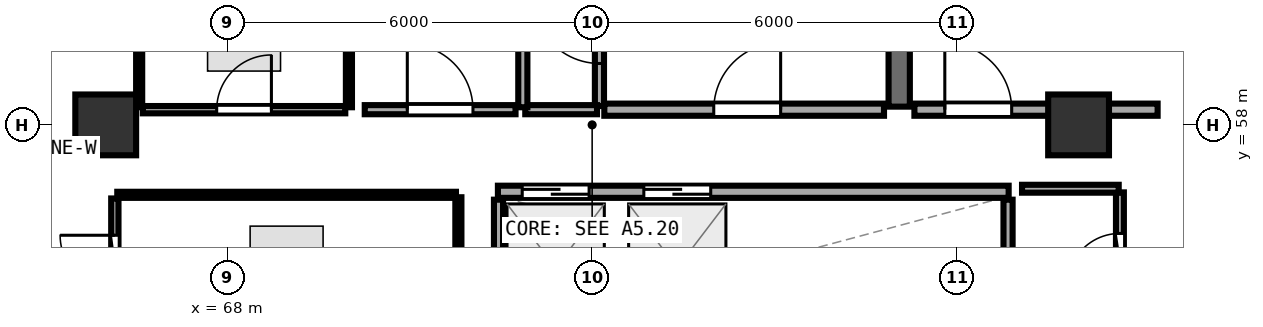
"""IFC4 building model, lengths in metres.
Left out: names, types, materials, properties, quantities, classifications, styles, units other than length and angle.
Written with IfcOpenShell. Run it as: python <this file> out.ifc"""

import sys

from ifc_helpers import new_model, si_unit, direction, frame, frame_2d, origin, origin_2d, place, context, subcontext, project, spatial, rectangle, extrude, element, fill, save


model = new_model("IFC4")
c1 = context("Model", 3, precision=1e-05, world=origin(), true_north=direction((0.0, 1.0)))
c2 = subcontext(c1, "Body", "Model", "MODEL_VIEW")
j1 = project(units=[si_unit("LENGTHUNIT", "METRE"), si_unit("PLANEANGLEUNIT", "RADIAN")], contexts=[c1])
p1 = place(None, origin())
s1 = spatial("IfcSite", under=j1, at=p1, CompositionType="ELEMENT")
p2 = place(p1, origin())
s2 = spatial("IfcBuilding", under=s1, at=p2, CompositionType="ELEMENT")
p3 = place(p2, frame((0.0, 0.0, 252.45)))
s3 = spatial("IfcBuildingStorey", under=s2, at=p3, CompositionType="ELEMENT", Elevation=252.45)
for number, where, z_axis, x_axis in (
    (1, (82.0, 58.0, 0.0), (0.0, 0.0, 1.0), (1.0, 0.0, 0.0)),
    (2, (66.0, 58.0, 0.0), (0.0, 0.0, 1.0), (1.0, 0.0, 0.0)),
):
    element("IfcColumn", number, at=place(p3, frame(where, z_axis=z_axis, x_axis=x_axis)), inside=s3, PredefinedType="PILASTER", context=c2, shape_type="SweptSolid", body=[
        extrude(rectangle(XDim=1.0, YDim=1.0, at=origin_2d()), origin(), (0.0, 0.0, 1.0), 3.75),
    ])
p4 = place(p3, frame((79.05, 58.3, 0.0), z_axis=(0.0, 0.0, 1.0), x_axis=(0.0, 1.0, 0.0)))
e3 = element("IfcWall", 3, at=p4, inside=s3, PredefinedType="SHEAR", context=c2, shape_type="SweptSolid", body=[
    extrude(rectangle(XDim=6.3, YDim=0.35, at=frame_2d((3.15, 0.0))), origin(), (0.0, 0.0, 1.0), 3.49),
])
p5 = place(p3, frame((74.2, 58.25, 0.0), z_axis=(0.0, 0.0, 1.0), x_axis=(1.0, 0.0, 0.0)))
e4 = element("IfcWall", 4, at=p5, inside=s3, PredefinedType="SOLIDWALL", context=c2, shape_type="SweptSolid", body=[
    extrude(rectangle(XDim=4.6, YDim=0.2, at=frame_2d((2.3, 0.0))), origin(), (0.0, 0.0, 1.0), 3.48),
])
p6 = place(p5, frame((1.8, 0.0, 0.0)))
e5 = element("IfcOpeningElement", 5, at=p6, cuts=e4, PredefinedType="OPENING", context=c2, shape_type="SweptSolid", body=[
    extrude(rectangle(XDim=1.1, YDim=2.1, at=frame_2d((0.55, 1.05))), frame((0.0, 0.11, 0.0), z_axis=(0.0, -1.0, 0.0), x_axis=(1.0, 0.0, 0.0)), (0.0, 0.0, 1.0), 0.22),
])
p7 = place(p3, frame((79.3, 58.25, 0.0), z_axis=(0.0, 0.0, 1.0), x_axis=(1.0, 0.0, 0.0)))
e6 = element("IfcWall", 6, at=p7, inside=s3, PredefinedType="SOLIDWALL", context=c2, shape_type="SweptSolid", body=[
    extrude(rectangle(XDim=4.0, YDim=0.2, at=frame_2d((2.0, 0.0))), origin(), (0.0, 0.0, 1.0), 2.775),
])
p8 = place(p7, frame((0.5, 0.0, 0.0)))
e7 = element("IfcOpeningElement", 7, at=p8, cuts=e6, PredefinedType="OPENING", context=c2, shape_type="SweptSolid", body=[
    extrude(rectangle(XDim=1.1, YDim=2.1, at=frame_2d((0.55, 1.05))), frame((0.0, 0.11, 0.0), z_axis=(0.0, -1.0, 0.0), x_axis=(1.0, 0.0, 0.0)), (0.0, 0.0, 1.0), 0.22),
])
p9 = place(p3, frame((72.45, 56.9, 0.0), z_axis=(0.0, 0.0, 1.0), x_axis=(1.0, 0.0, 0.0)))
e8 = element("IfcWall", 8, at=p9, inside=s3, PredefinedType="SOLIDWALL", context=c2, shape_type="SweptSolid", body=[
    extrude(rectangle(XDim=8.4, YDim=0.2, at=frame_2d((4.2, 0.0))), origin(), (0.0, 0.0, 1.0), 3.48),
])
p10 = place(p9, frame((0.4, 0.0, 0.0)))
e9 = element("IfcOpeningElement", 9, at=p10, cuts=e8, PredefinedType="OPENING", context=c2, shape_type="SweptSolid", body=[
    extrude(rectangle(XDim=1.1, YDim=2.1, at=frame_2d((0.55, 1.05))), frame((0.0, 0.11, 0.0), z_axis=(0.0, -1.0, 0.0), x_axis=(1.0, 0.0, 0.0)), (0.0, 0.0, 1.0), 0.22),
])
p11 = place(p9, frame((2.4, 0.0, 0.0)))
e10 = element("IfcOpeningElement", 10, at=p11, cuts=e8, PredefinedType="OPENING", context=c2, shape_type="SweptSolid", body=[
    extrude(rectangle(XDim=1.1, YDim=2.1, at=frame_2d((0.55, 1.05))), frame((0.0, 0.11, 0.0), z_axis=(0.0, -1.0, 0.0), x_axis=(1.0, 0.0, 0.0)), (0.0, 0.0, 1.0), 0.22),
])
for number, where, z_axis, x_axis in (
    (11, (72.46, 54.48, 0.0), (0.0, 0.0, 1.0), (0.0, 1.0, 0.0)),
    (12, (80.84, 54.48, 0.0), (0.0, 0.0, 1.0), (0.0, 1.0, 0.0)),
):
    element("IfcWall", number, at=place(p3, frame(where, z_axis=z_axis, x_axis=x_axis)), inside=s3, PredefinedType="PARTITIONING", context=c2, shape_type="SweptSolid", body=[
        extrude(rectangle(XDim=2.29, YDim=0.15, at=frame_2d((1.145, 0.0))), origin(), (0.0, 0.0, 1.0), 3.48),
    ])
p12 = place(p3, frame((74.12, 58.31, 0.0), z_axis=(0.0, 0.0, 1.0), x_axis=(0.0, 1.0, 0.0)))
e13 = element("IfcWall", 13, at=p12, inside=s3, PredefinedType="PARTITIONING", context=c2, shape_type="SweptSolid", body=[
    extrude(rectangle(XDim=2.48, YDim=0.15, at=frame_2d((1.24, 0.0))), origin(), (0.0, 0.0, 1.0), 3.48),
])
p13 = place(p12, frame((0.7, 0.0, 0.0)))
e14 = element("IfcOpeningElement", 14, at=p13, cuts=e13, PredefinedType="OPENING", context=c2, shape_type="SweptSolid", body=[
    extrude(rectangle(XDim=1.08, YDim=2.1, at=frame_2d((0.54, 1.05))), frame((0.0, 0.085, 0.0), z_axis=(0.0, -1.0, 0.0), x_axis=(1.0, 0.0, 0.0)), (0.0, 0.0, 1.0), 0.17),
])
p14 = place(p3, frame((82.68, 54.68, 0.0), z_axis=(0.0, 0.0, 1.0), x_axis=(0.0, 1.0, 0.0)))
e15 = element("IfcWall", 15, at=p14, inside=s3, PredefinedType="PLUMBINGWALL", context=c2, shape_type="SweptSolid", body=[
    extrude(rectangle(XDim=2.21, YDim=0.13, at=frame_2d((1.105, 0.0))), origin(), (0.0, 0.0, 1.0), 3.48),
])
p15 = place(p14, frame((0.675, 0.0, 0.0)))
e16 = element("IfcOpeningElement", 16, at=p15, cuts=e15, PredefinedType="OPENING", context=c2, shape_type="SweptSolid", body=[
    extrude(rectangle(XDim=0.86, YDim=2.05, at=frame_2d((0.43, 1.025))), frame((0.0, 0.075, 0.0), z_axis=(0.0, -1.0, 0.0), x_axis=(1.0, 0.0, 0.0)), (0.0, 0.0, 1.0), 0.15),
])
p16 = place(p3, frame((66.61, 58.25, 0.0), z_axis=(0.0, 0.0, 1.0), x_axis=(1.0, 0.0, 0.0)))
e17 = element("IfcWall", 17, at=p16, inside=s3, PredefinedType="PARTITIONING", context=c2, shape_type="SweptSolid", body=[
    extrude(rectangle(XDim=3.33, YDim=0.12, at=frame_2d((1.665, 0.0))), origin(), (0.0, 0.0, 1.0), 3.48),
])
p17 = place(p16, frame((1.215, 0.0, 0.0)))
e18 = element("IfcOpeningElement", 18, at=p17, cuts=e17, PredefinedType="OPENING", context=c2, shape_type="SweptSolid", body=[
    extrude(rectangle(XDim=0.9, YDim=2.08, at=frame_2d((0.45, 1.04))), frame((0.0, 0.07, 0.0), z_axis=(0.0, -1.0, 0.0), x_axis=(1.0, 0.0, 0.0)), (0.0, 0.0, 1.0), 0.14),
])
p18 = place(p3, frame((70.26, 58.25, 0.0), z_axis=(0.0, 0.0, 1.0), x_axis=(1.0, 0.0, 0.0)))
e19 = element("IfcWall", 19, at=p18, inside=s3, PredefinedType="PARTITIONING", context=c2, shape_type="SweptSolid", body=[
    extrude(rectangle(XDim=2.48, YDim=0.15, at=frame_2d((1.24, 0.0))), origin(), (0.0, 0.0, 1.0), 3.48),
])
p19 = place(p18, frame((0.7, 0.0, 0.0)))
e20 = element("IfcOpeningElement", 20, at=p19, cuts=e19, PredefinedType="OPENING", context=c2, shape_type="SweptSolid", body=[
    extrude(rectangle(XDim=1.08, YDim=2.1, at=frame_2d((0.54, 1.05))), frame((0.0, 0.085, 0.0), z_axis=(0.0, -1.0, 0.0), x_axis=(1.0, 0.0, 0.0)), (0.0, 0.0, 1.0), 0.17),
])
p20 = place(p3, frame((66.15, 54.68, 0.0), z_axis=(0.0, 0.0, 1.0), x_axis=(0.0, 1.0, 0.0)))
e21 = element("IfcWall", 21, at=p20, inside=s3, PredefinedType="PARTITIONING", context=c2, shape_type="SweptSolid", body=[
    extrude(rectangle(XDim=2.11, YDim=0.12, at=frame_2d((1.055, 0.0))), origin(), (0.0, 0.0, 1.0), 2.775),
])
p21 = place(p20, frame((0.605, 0.0, 0.0)))
e22 = element("IfcOpeningElement", 22, at=p21, cuts=e21, PredefinedType="OPENING", context=c2, shape_type="SweptSolid", body=[
    extrude(rectangle(XDim=0.9, YDim=2.08, at=frame_2d((0.45, 1.04))), frame((0.0, 0.07, 0.0), z_axis=(0.0, -1.0, 0.0), x_axis=(1.0, 0.0, 0.0)), (0.0, 0.0, 1.0), 0.14),
])
p22 = place(p3, frame((72.9, 58.25, 0.0), z_axis=(0.0, 0.0, 1.0), x_axis=(1.0, 0.0, 0.0)))
e23 = element("IfcWall", 23, at=p22, inside=s3, PredefinedType="PARTITIONING", context=c2, shape_type="SweptSolid", body=[
    extrude(rectangle(XDim=1.18, YDim=0.15, at=frame_2d((0.59, 0.0))), origin(), (0.0, 0.0, 1.0), 3.48),
])
p23 = place(p3, frame((72.86, 60.81, 0.0), z_axis=(0.0, 0.0, 1.0), x_axis=(0.0, -1.0, 0.0)))
e24 = element("IfcWall", 24, at=p23, inside=s3, PredefinedType="PARTITIONING", context=c2, shape_type="SweptSolid", body=[
    extrude(rectangle(XDim=2.52, YDim=0.15, at=frame_2d((1.26, 0.0))), origin(), (0.0, 0.0, 1.0), 3.48),
])
p24 = place(p3, frame((82.66, 56.95, 0.0), z_axis=(0.0, 0.0, 1.0), x_axis=(-1.0, 0.0, 0.0)))
e25 = element("IfcWall", 25, at=p24, inside=s3, PredefinedType="PLUMBINGWALL", context=c2, shape_type="SweptSolid", body=[
    extrude(rectangle(XDim=1.59, YDim=0.13, at=frame_2d((0.795, 0.0))), origin(), (0.0, 0.0, 1.0), 2.775),
])
for number, where, z_axis, x_axis in (
    (26, (70.0, 58.29, 0.0), (0.0, 0.0, 1.0), (0.0, 1.0, 0.0)),
    (27, (66.55, 60.68, 0.0), (0.0, 0.0, 1.0), (0.0, -1.0, 0.0)),
):
    element("IfcWall", number, at=place(p3, frame(where, z_axis=z_axis, x_axis=x_axis)), inside=s3, PredefinedType="PARTITIONING", context=c2, shape_type="SweptSolid", body=[
        extrude(rectangle(XDim=2.39, YDim=0.1, at=frame_2d((1.195, 0.0))), origin(), (0.0, 0.0, 1.0), 3.48),
    ])
p25 = place(p3, frame((71.8, 54.66, 0.0), z_axis=(0.0, 0.0, 1.0), x_axis=(0.0, 1.0, 0.0)))
e28 = element("IfcWall", 28, at=p25, inside=s3, PredefinedType="PARTITIONING", context=c2, shape_type="SweptSolid", body=[
    extrude(rectangle(XDim=2.15, YDim=0.1, at=frame_2d((1.075, 0.0))), origin(), (0.0, 0.0, 1.0), 3.48),
])
p26 = place(p3, frame((71.76, 56.85, 0.0), z_axis=(0.0, 0.0, 1.0), x_axis=(-1.0, 0.0, 0.0)))
e29 = element("IfcWall", 29, at=p26, inside=s3, PredefinedType="PARTITIONING", context=c2, shape_type="SweptSolid", body=[
    extrude(rectangle(XDim=5.57, YDim=0.1, at=frame_2d((2.785, 0.0))), origin(), (0.0, 0.0, 1.0), 2.775),
])
p27 = place(p6, frame((1.1, 0.0, 0.0), z_axis=(0.0, 0.0, 1.0), x_axis=(-1.0, 0.0, 0.0)))
e30 = element("IfcDoor", 30, at=p27, inside=s3, OperationType="SINGLE_SWING_LEFT", PredefinedType="DOOR", context=c2, shape_type="SweptSolid", body=[
    extrude(rectangle(XDim=1.1, YDim=2.1, at=frame_2d((0.55, 1.05))), frame((0.0, 0.025, 0.0), z_axis=(0.0, -1.0, 0.0), x_axis=(1.0, 0.0, 0.0)), (0.0, 0.0, 1.0), 0.05),
])
fill(e5, e30)
p28 = place(p8, frame((1.1, 0.0, 0.0), z_axis=(0.0, 0.0, 1.0), x_axis=(-1.0, 0.0, 0.0)))
e31 = element("IfcDoor", 31, at=p28, inside=s3, OperationType="SINGLE_SWING_RIGHT", PredefinedType="DOOR", context=c2, shape_type="SweptSolid", body=[
    extrude(rectangle(XDim=1.1, YDim=2.1, at=frame_2d((0.55, 1.05))), frame((0.0, 0.025, 0.0), z_axis=(0.0, -1.0, 0.0), x_axis=(1.0, 0.0, 0.0)), (0.0, 0.0, 1.0), 0.05),
])
fill(e7, e31)
p29 = place(p10, origin())
e32 = element("IfcDoor", 32, at=p29, inside=s3, OperationType="DOUBLE_DOOR_SLIDING", PredefinedType="DOOR", context=c2, shape_type="SweptSolid", body=[
    extrude(rectangle(XDim=1.1, YDim=2.1, at=frame_2d((0.55, 1.05))), frame((0.0, 0.025, 0.0), z_axis=(0.0, -1.0, 0.0), x_axis=(1.0, 0.0, 0.0)), (0.0, 0.0, 1.0), 0.05),
])
fill(e9, e32)
p30 = place(p11, origin())
e33 = element("IfcDoor", 33, at=p30, inside=s3, OperationType="DOUBLE_DOOR_SLIDING", PredefinedType="DOOR", context=c2, shape_type="SweptSolid", body=[
    extrude(rectangle(XDim=1.1, YDim=2.1, at=frame_2d((0.55, 1.05))), frame((0.0, 0.025, 0.0), z_axis=(0.0, -1.0, 0.0), x_axis=(1.0, 0.0, 0.0)), (0.0, 0.0, 1.0), 0.05),
])
fill(e10, e33)
p31 = place(p13, origin())
e34 = element("IfcDoor", 34, at=p31, inside=s3, OperationType="SINGLE_SWING_RIGHT", PredefinedType="DOOR", context=c2, shape_type="SweptSolid", body=[
    extrude(rectangle(XDim=1.08, YDim=2.1, at=frame_2d((0.54, 1.05))), frame((0.0, 0.025, 0.0), z_axis=(0.0, -1.0, 0.0), x_axis=(1.0, 0.0, 0.0)), (0.0, 0.0, 1.0), 0.05),
])
fill(e14, e34)
p32 = place(p15, origin())
e35 = element("IfcDoor", 35, at=p32, inside=s3, OperationType="SINGLE_SWING_LEFT", PredefinedType="DOOR", context=c2, shape_type="SweptSolid", body=[
    extrude(rectangle(XDim=0.86, YDim=2.05, at=frame_2d((0.43, 1.025))), frame((0.0, 0.025, 0.0), z_axis=(0.0, -1.0, 0.0), x_axis=(1.0, 0.0, 0.0)), (0.0, 0.0, 1.0), 0.05),
])
fill(e16, e35)
p33 = place(p17, origin())
e36 = element("IfcDoor", 36, at=p33, inside=s3, OperationType="SINGLE_SWING_RIGHT", PredefinedType="DOOR", context=c2, shape_type="SweptSolid", body=[
    extrude(rectangle(XDim=0.9, YDim=2.08, at=frame_2d((0.45, 1.04))), frame((0.0, 0.025, 0.0), z_axis=(0.0, -1.0, 0.0), x_axis=(1.0, 0.0, 0.0)), (0.0, 0.0, 1.0), 0.05),
])
fill(e18, e36)
p34 = place(p19, origin())
e37 = element("IfcDoor", 37, at=p34, inside=s3, OperationType="SINGLE_SWING_LEFT", PredefinedType="DOOR", context=c2, shape_type="SweptSolid", body=[
    extrude(rectangle(XDim=1.08, YDim=2.1, at=frame_2d((0.54, 1.05))), frame((0.0, 0.025, 0.0), z_axis=(0.0, -1.0, 0.0), x_axis=(1.0, 0.0, 0.0)), (0.0, 0.0, 1.0), 0.05),
])
fill(e20, e37)
p35 = place(p21, origin())
e38 = element("IfcDoor", 38, at=p35, inside=s3, OperationType="SINGLE_SWING_RIGHT", PredefinedType="DOOR", context=c2, shape_type="SweptSolid", body=[
    extrude(rectangle(XDim=0.9, YDim=2.08, at=frame_2d((0.45, 1.04))), frame((0.0, 0.025, 0.0), z_axis=(0.0, -1.0, 0.0), x_axis=(1.0, 0.0, 0.0)), (0.0, 0.0, 1.0), 0.05),
])
fill(e22, e38)
save(model, sys.argv[1])
